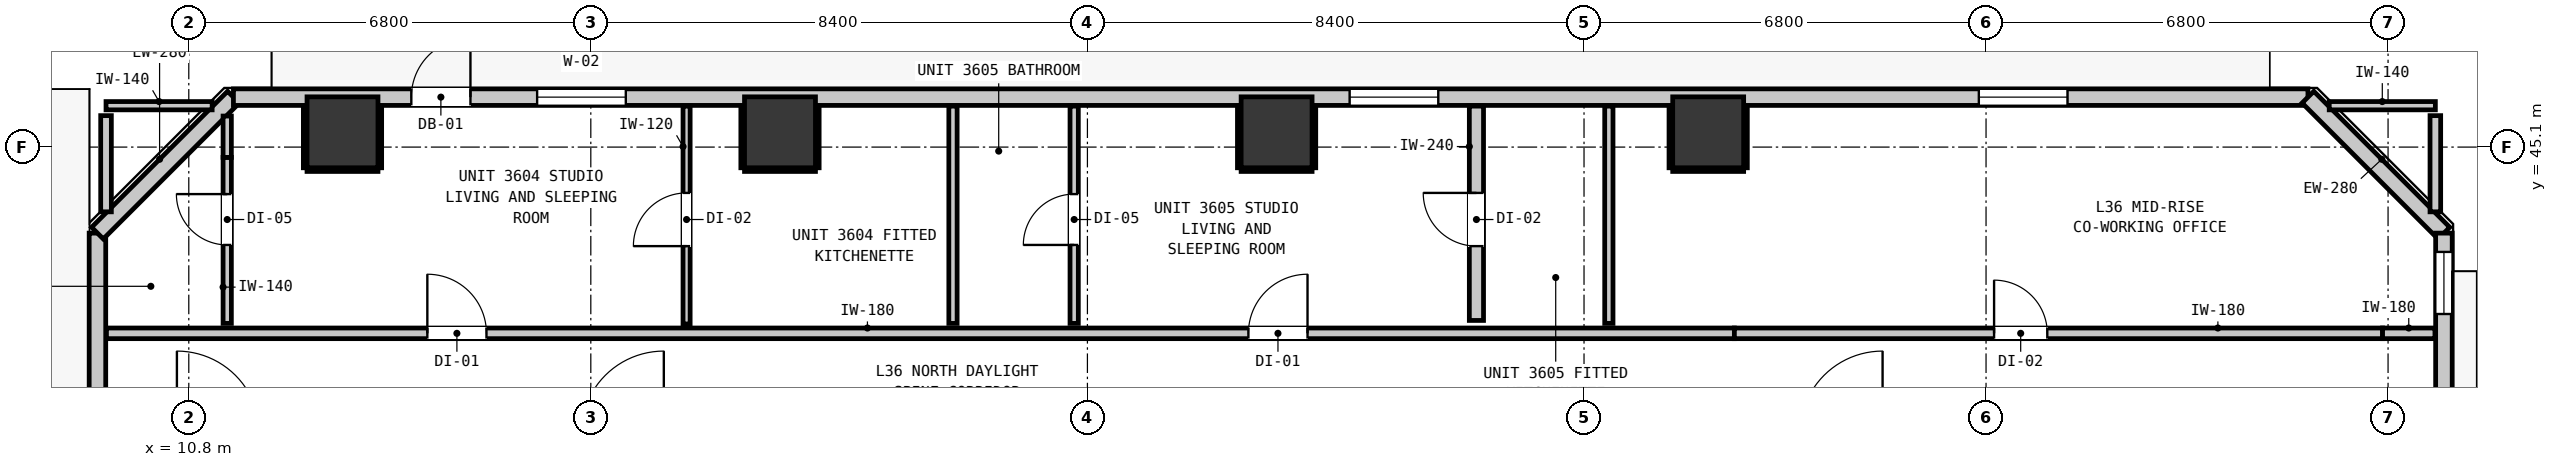
"""IFC4 building model, lengths in metres.
Left out: names, types, materials, properties, quantities, classifications, styles, units other than length and angle.
Written with IfcOpenShell. Run it as: python <this file> out.ifc"""

import sys

from ifc_helpers import new_model, si_unit, direction, frame, frame_2d, origin, origin_2d, place, context, subcontext, project, spatial, rectangle, extrude, element, fill, save


model = new_model("IFC4")
c1 = context("Model", 3, precision=1e-05, world=origin(), true_north=direction((0.0, 1.0)))
c2 = subcontext(c1, "Body", "Model", "MODEL_VIEW")
j1 = project(units=[si_unit("LENGTHUNIT", "METRE"), si_unit("PLANEANGLEUNIT", "RADIAN")], contexts=[c1])
p1 = place(None, origin())
s1 = spatial("IfcSite", under=j1, at=p1, CompositionType="ELEMENT")
p2 = place(p1, origin())
s2 = spatial("IfcBuilding", under=s1, at=p2, CompositionType="ELEMENT")
p3 = place(p2, frame((0.0, 0.0, 126.0)))
s3 = spatial("IfcBuildingStorey", under=s2, at=p3, CompositionType="ELEMENT", Elevation=126.0)
for number, where, z_axis, x_axis in (
    (1, (13.4, 45.35, -0.2), (0.0, 0.0, 1.0), (1.0, 0.0, 0.0)),
    (2, (20.8, 45.35, -0.2), (0.0, 0.0, 1.0), (1.0, 0.0, 0.0)),
    (3, (29.2, 45.35, -0.2), (0.0, 0.0, 1.0), (1.0, 0.0, 0.0)),
    (4, (36.5, 45.35, -0.2), (0.0, 0.0, 1.0), (1.0, 0.0, 0.0)),
):
    element("IfcColumn", number, at=place(p3, frame(where, z_axis=z_axis, x_axis=x_axis)), inside=s3, PredefinedType="COLUMN", context=c2, shape_type="SweptSolid", body=[
        extrude(rectangle(XDim=1.2, YDim=1.2, at=origin_2d()), origin(), (0.0, 0.0, 1.0), 3.52),
    ])
p4 = place(p3, frame((9.255, 11.355, 0.0), z_axis=(0.0, 0.0, 1.0), x_axis=(0.0, 1.0, 0.0)))
e5 = element("IfcWall", 5, at=p4, inside=s3, PredefinedType="STANDARD", context=c2, shape_type="SweptSolid", body=[
    extrude(rectangle(XDim=32.29, YDim=0.28, at=frame_2d((16.145, 0.0))), origin(), (0.0, 0.0, 1.0), 3.08),
])
p5 = place(p4, frame((0.503, 0.0, 0.0)))
e6 = element("IfcOpeningElement", 6, at=p5, cuts=e5, PredefinedType="OPENING", context=c2, shape_type="SweptSolid", body=[
    extrude(rectangle(XDim=1.1, YDim=2.15, at=frame_2d((0.55, 1.075))), frame((0.0, 0.15, 0.0), z_axis=(0.0, -1.0, 0.0), x_axis=(1.0, 0.0, 0.0)), (0.0, 0.0, 1.0), 0.3),
])
p6 = place(p3, frame((9.255, 43.645, 0.0), z_axis=(0.0, 0.0, 1.0), x_axis=(0.707106781187, 0.707106781187, 0.0)))
e7 = element("IfcWall", 7, at=p6, inside=s3, PredefinedType="STANDARD", context=c2, shape_type="SweptSolid", body=[
    extrude(rectangle(XDim=3.253, YDim=0.28, at=frame_2d((1.626, 0.0))), origin(), (0.0, 0.0, 1.0), 3.08),
])
p7 = place(p3, frame((11.555, 45.945, 0.0), z_axis=(0.0, 0.0, 1.0), x_axis=(1.0, 0.0, 0.0)))
e8 = element("IfcWall", 8, at=p7, inside=s3, PredefinedType="STANDARD", context=c2, shape_type="SweptSolid", body=[
    extrude(rectangle(XDim=35.09, YDim=0.28, at=frame_2d((17.545, 0.0))), origin(), (0.0, 0.0, 1.0), 3.08),
])
p8 = place(p7, frame((3.009, 0.0, 0.0)))
e9 = element("IfcOpeningElement", 9, at=p8, cuts=e8, PredefinedType="OPENING", context=c2, shape_type="SweptSolid", body=[
    extrude(rectangle(XDim=1.0, YDim=2.15, at=frame_2d((0.5, 1.075))), frame((0.0, 0.15, 0.0), z_axis=(0.0, -1.0, 0.0), x_axis=(1.0, 0.0, 0.0)), (0.0, 0.0, 1.0), 0.3),
])
p9 = place(p7, frame((5.137, 0.0, 0.85)))
e10 = element("IfcOpeningElement", 10, at=p9, cuts=e8, PredefinedType="OPENING", context=c2, shape_type="SweptSolid", body=[
    extrude(rectangle(XDim=1.5, YDim=1.8, at=frame_2d((0.75, 0.9))), frame((0.0, 0.15, 0.0), z_axis=(0.0, -1.0, 0.0), x_axis=(1.0, 0.0, 0.0)), (0.0, 0.0, 1.0), 0.3),
])
p10 = place(p7, frame((18.88, 0.0, 0.85)))
e11 = element("IfcOpeningElement", 11, at=p10, cuts=e8, PredefinedType="OPENING", context=c2, shape_type="SweptSolid", body=[
    extrude(rectangle(XDim=1.5, YDim=1.8, at=frame_2d((0.75, 0.9))), frame((0.0, 0.15, 0.0), z_axis=(0.0, -1.0, 0.0), x_axis=(1.0, 0.0, 0.0)), (0.0, 0.0, 1.0), 0.3),
])
p11 = place(p7, frame((29.523, 0.0, 0.85)))
e12 = element("IfcOpeningElement", 12, at=p11, cuts=e8, PredefinedType="OPENING", context=c2, shape_type="SweptSolid", body=[
    extrude(rectangle(XDim=1.5, YDim=1.8, at=frame_2d((0.75, 0.9))), frame((0.0, 0.15, 0.0), z_axis=(0.0, -1.0, 0.0), x_axis=(1.0, 0.0, 0.0)), (0.0, 0.0, 1.0), 0.3),
])
p12 = place(p3, frame((46.645, 45.945, 0.0), z_axis=(0.0, 0.0, 1.0), x_axis=(0.707106781187, -0.707106781187, 0.0)))
e13 = element("IfcWall", 13, at=p12, inside=s3, PredefinedType="STANDARD", context=c2, shape_type="SweptSolid", body=[
    extrude(rectangle(XDim=3.253, YDim=0.28, at=frame_2d((1.626, 0.0))), origin(), (0.0, 0.0, 1.0), 3.08),
])
p13 = place(p3, frame((48.945, 43.645, 0.0), z_axis=(0.0, 0.0, 1.0), x_axis=(0.0, -1.0, 0.0)))
e14 = element("IfcWall", 14, at=p13, inside=s3, PredefinedType="STANDARD", context=c2, shape_type="SweptSolid", body=[
    extrude(rectangle(XDim=32.29, YDim=0.28, at=frame_2d((16.145, 0.0))), origin(), (0.0, 0.0, 1.0), 3.08),
])
p14 = place(p13, frame((6.52, 0.0, 0.0)))
e15 = element("IfcOpeningElement", 15, at=p14, cuts=e14, PredefinedType="OPENING", context=c2, shape_type="SweptSolid", body=[
    extrude(rectangle(XDim=1.0, YDim=2.15, at=frame_2d((0.5, 1.075))), frame((0.0, 0.15, 0.0), z_axis=(0.0, -1.0, 0.0), x_axis=(1.0, 0.0, 0.0)), (0.0, 0.0, 1.0), 0.3),
])
p15 = place(p13, frame((0.318, 0.0, 0.85)))
e16 = element("IfcOpeningElement", 16, at=p15, cuts=e14, PredefinedType="OPENING", context=c2, shape_type="SweptSolid", body=[
    extrude(rectangle(XDim=1.05, YDim=1.65, at=frame_2d((0.525, 0.825))), frame((0.0, 0.15, 0.0), z_axis=(0.0, -1.0, 0.0), x_axis=(1.0, 0.0, 0.0)), (0.0, 0.0, 1.0), 0.3),
])
p16 = place(p13, frame((16.674, 0.0, 0.85)))
e17 = element("IfcOpeningElement", 17, at=p16, cuts=e14, PredefinedType="OPENING", context=c2, shape_type="SweptSolid", body=[
    extrude(rectangle(XDim=1.5, YDim=1.8, at=frame_2d((0.75, 0.9))), frame((0.0, 0.15, 0.0), z_axis=(0.0, -1.0, 0.0), x_axis=(1.0, 0.0, 0.0)), (0.0, 0.0, 1.0), 0.3),
])
p17 = place(p13, frame((13.773, 0.0, 0.85)))
e18 = element("IfcOpeningElement", 18, at=p17, cuts=e14, PredefinedType="OPENING", context=c2, shape_type="SweptSolid", body=[
    extrude(rectangle(XDim=1.05, YDim=1.65, at=frame_2d((0.525, 0.825))), frame((0.0, 0.15, 0.0), z_axis=(0.0, -1.0, 0.0), x_axis=(1.0, 0.0, 0.0)), (0.0, 0.0, 1.0), 0.3),
])
p18 = place(p13, frame((7.907, 0.0, 0.85)))
e19 = element("IfcOpeningElement", 19, at=p18, cuts=e14, PredefinedType="OPENING", context=c2, shape_type="SweptSolid", body=[
    extrude(rectangle(XDim=1.5, YDim=1.8, at=frame_2d((0.75, 0.9))), frame((0.0, 0.15, 0.0), z_axis=(0.0, -1.0, 0.0), x_axis=(1.0, 0.0, 0.0)), (0.0, 0.0, 1.0), 0.3),
])
p19 = place(p13, frame((5.043, 0.0, 0.85)))
e20 = element("IfcOpeningElement", 20, at=p19, cuts=e14, PredefinedType="OPENING", context=c2, shape_type="SweptSolid", body=[
    extrude(rectangle(XDim=0.58, YDim=1.5, at=frame_2d((0.29, 0.75))), frame((0.0, 0.15, 0.0), z_axis=(0.0, -1.0, 0.0), x_axis=(1.0, 0.0, 0.0)), (0.0, 0.0, 1.0), 0.3),
])
p20 = place(p3, frame((9.407, 41.95, 0.0), z_axis=(0.0, 0.0, 1.0), x_axis=(1.0, 0.0, 0.0)))
e21 = element("IfcWall", 21, at=p20, inside=s3, PredefinedType="PARTITIONING", context=c2, shape_type="SweptSolid", body=[
    extrude(rectangle(XDim=27.536, YDim=0.18, at=frame_2d((13.768, 0.0))), origin(), (0.0, 0.0, 1.0), 3.08),
])
p21 = place(p20, frame((5.428, 0.0, 0.0)))
e22 = element("IfcOpeningElement", 22, at=p21, cuts=e21, PredefinedType="OPENING", context=c2, shape_type="SweptSolid", body=[
    extrude(rectangle(XDim=1.0, YDim=2.15, at=frame_2d((0.5, 1.075))), frame((0.0, 0.1, 0.0), z_axis=(0.0, -1.0, 0.0), x_axis=(1.0, 0.0, 0.0)), (0.0, 0.0, 1.0), 0.2),
])
p22 = place(p20, frame((19.316, 0.0, 0.0)))
e23 = element("IfcOpeningElement", 23, at=p22, cuts=e21, PredefinedType="OPENING", context=c2, shape_type="SweptSolid", body=[
    extrude(rectangle(XDim=1.0, YDim=2.15, at=frame_2d((0.5, 1.075))), frame((0.0, 0.1, 0.0), z_axis=(0.0, -1.0, 0.0), x_axis=(1.0, 0.0, 0.0)), (0.0, 0.0, 1.0), 0.2),
])
p23 = place(p3, frame((36.943, 41.95, 0.0), z_axis=(0.0, 0.0, 1.0), x_axis=(1.0, 0.0, 0.0)))
e24 = element("IfcWall", 24, at=p23, inside=s3, PredefinedType="PARTITIONING", context=c2, shape_type="SweptSolid", body=[
    extrude(rectangle(XDim=10.964, YDim=0.18, at=frame_2d((5.482, 0.0))), origin(), (0.0, 0.0, 1.0), 2.565),
])
p24 = place(p23, frame((4.393, 0.0, 0.0)))
e25 = element("IfcOpeningElement", 25, at=p24, cuts=e24, PredefinedType="OPENING", context=c2, shape_type="SweptSolid", body=[
    extrude(rectangle(XDim=0.9, YDim=2.1, at=frame_2d((0.45, 1.05))), frame((0.0, 0.1, 0.0), z_axis=(0.0, -1.0, 0.0), x_axis=(1.0, 0.0, 0.0)), (0.0, 0.0, 1.0), 0.2),
])
p25 = place(p3, frame((47.907, 41.95, 0.0), z_axis=(0.0, 0.0, 1.0), x_axis=(1.0, 0.0, 0.0)))
e26 = element("IfcWall", 26, at=p25, inside=s3, PredefinedType="PARTITIONING", context=c2, shape_type="SweptSolid", body=[
    extrude(rectangle(XDim=0.886, YDim=0.18, at=frame_2d((0.443, 0.0))), origin(), (0.0, 0.0, 1.0), 3.08),
])
for number, where, z_axis, x_axis in (
    (27, (9.4, 45.8, 0.0), (0.0, 0.0, 1.0), (1.0, 0.0, 0.0)),
    (28, (47.005, 45.8, 0.0), (0.0, 0.0, 1.0), (1.0, 0.0, 0.0)),
):
    element("IfcWall", number, at=place(p3, frame(where, z_axis=z_axis, x_axis=x_axis)), inside=s3, PredefinedType="PARTITIONING", context=c2, shape_type="SweptSolid", body=[
        extrude(rectangle(XDim=1.795, YDim=0.14, at=frame_2d((0.897, 0.0))), origin(), (0.0, 0.0, 1.0), 3.08),
    ])
p26 = place(p3, frame((32.58, 42.168, 0.0), z_axis=(0.0, 0.0, 1.0), x_axis=(0.0, 1.0, 0.0)))
e29 = element("IfcWall", 29, at=p26, inside=s3, PredefinedType="PARTITIONING", context=c2, shape_type="SweptSolid", body=[
    extrude(rectangle(XDim=3.625, YDim=0.24, at=frame_2d((1.812, 0.0))), origin(), (0.0, 0.0, 1.0), 3.08),
])
p27 = place(p26, frame((1.257, 0.0, 0.0)))
e30 = element("IfcOpeningElement", 30, at=p27, cuts=e29, PredefinedType="OPENING", context=c2, shape_type="SweptSolid", body=[
    extrude(rectangle(XDim=0.9, YDim=2.1, at=frame_2d((0.45, 1.05))), frame((0.0, 0.13, 0.0), z_axis=(0.0, -1.0, 0.0), x_axis=(1.0, 0.0, 0.0)), (0.0, 0.0, 1.0), 0.26),
])
for number, where, z_axis, x_axis in (
    (31, (9.4, 44.005, 0.0), (0.0, 0.0, 1.0), (0.0, 1.0, 0.0)),
    (32, (48.8, 44.005, 0.0), (0.0, 0.0, 1.0), (0.0, 1.0, 0.0)),
):
    element("IfcWall", number, at=place(p3, frame(where, z_axis=z_axis, x_axis=x_axis)), inside=s3, PredefinedType="PARTITIONING", context=c2, shape_type="SweptSolid", body=[
        extrude(rectangle(XDim=1.627, YDim=0.18, at=frame_2d((0.813, 0.0))), origin(), (0.0, 0.0, 1.0), 3.08),
    ])
p28 = place(p3, frame((11.45, 42.118, 0.0), z_axis=(0.0, 0.0, 1.0), x_axis=(0.0, 1.0, 0.0)))
e33 = element("IfcWall", 33, at=p28, inside=s3, PredefinedType="PARTITIONING", context=c2, shape_type="SweptSolid", body=[
    extrude(rectangle(XDim=2.808, YDim=0.14, at=frame_2d((1.404, 0.0))), origin(), (0.0, 0.0, 1.0), 2.565),
])
p29 = place(p28, frame((1.327, 0.0, 0.0)))
e34 = element("IfcOpeningElement", 34, at=p29, cuts=e33, PredefinedType="OPENING", context=c2, shape_type="SweptSolid", body=[
    extrude(rectangle(XDim=0.86, YDim=2.02, at=frame_2d((0.43, 1.01))), frame((0.0, 0.08, 0.0), z_axis=(0.0, -1.0, 0.0), x_axis=(1.0, 0.0, 0.0)), (0.0, 0.0, 1.0), 0.16),
])
p30 = place(p3, frame((11.45, 44.926, 0.0), z_axis=(0.0, 0.0, 1.0), x_axis=(0.0, 1.0, 0.0)))
e35 = element("IfcWall", 35, at=p30, inside=s3, PredefinedType="PARTITIONING", context=c2, shape_type="SweptSolid", body=[
    extrude(rectangle(XDim=0.699, YDim=0.14, at=frame_2d((0.35, 0.0))), origin(), (0.0, 0.0, 1.0), 3.08),
])
p31 = place(p3, frame((23.726, 42.118, 0.0), z_axis=(0.0, 0.0, 1.0), x_axis=(0.0, 1.0, 0.0)))
e36 = element("IfcWall", 36, at=p31, inside=s3, PredefinedType="PARTITIONING", context=c2, shape_type="SweptSolid", body=[
    extrude(rectangle(XDim=3.675, YDim=0.14, at=frame_2d((1.837, 0.0))), origin(), (0.0, 0.0, 1.0), 3.08),
])
p32 = place(p3, frame((25.776, 42.118, 0.0), z_axis=(0.0, 0.0, 1.0), x_axis=(0.0, 1.0, 0.0)))
e37 = element("IfcWall", 37, at=p32, inside=s3, PredefinedType="PARTITIONING", context=c2, shape_type="SweptSolid", body=[
    extrude(rectangle(XDim=3.675, YDim=0.14, at=frame_2d((1.837, 0.0))), origin(), (0.0, 0.0, 1.0), 3.08),
])
p33 = place(p32, frame((1.327, 0.0, 0.0)))
e38 = element("IfcOpeningElement", 38, at=p33, cuts=e37, PredefinedType="OPENING", context=c2, shape_type="SweptSolid", body=[
    extrude(rectangle(XDim=0.86, YDim=2.02, at=frame_2d((0.43, 1.01))), frame((0.0, 0.08, 0.0), z_axis=(0.0, -1.0, 0.0), x_axis=(1.0, 0.0, 0.0)), (0.0, 0.0, 1.0), 0.16),
])
p34 = place(p3, frame((34.82, 42.118, 0.0), z_axis=(0.0, 0.0, 1.0), x_axis=(0.0, 1.0, 0.0)))
e39 = element("IfcWall", 39, at=p34, inside=s3, PredefinedType="PARTITIONING", context=c2, shape_type="SweptSolid", body=[
    extrude(rectangle(XDim=3.675, YDim=0.14, at=frame_2d((1.837, 0.0))), origin(), (0.0, 0.0, 1.0), 3.08),
])
p35 = place(p3, frame((19.22, 42.108, 0.0), z_axis=(0.0, 0.0, 1.0), x_axis=(0.0, 1.0, 0.0)))
e40 = element("IfcWall", 40, at=p35, inside=s3, PredefinedType="PARTITIONING", context=c2, shape_type="SweptSolid", body=[
    extrude(rectangle(XDim=3.685, YDim=0.12, at=frame_2d((1.843, 0.0))), origin(), (0.0, 0.0, 1.0), 3.08),
])
p36 = place(p35, frame((1.317, 0.0, 0.0)))
e41 = element("IfcOpeningElement", 41, at=p36, cuts=e40, PredefinedType="OPENING", context=c2, shape_type="SweptSolid", body=[
    extrude(rectangle(XDim=0.9, YDim=2.1, at=frame_2d((0.45, 1.05))), frame((0.0, 0.07, 0.0), z_axis=(0.0, -1.0, 0.0), x_axis=(1.0, 0.0, 0.0)), (0.0, 0.0, 1.0), 0.14),
])
p37 = place(p3, frame((12.8, 44.718, 0.0), z_axis=(0.0, 0.0, 1.0), x_axis=(1.0, 0.0, 0.0)))
e42 = element("IfcWall", 42, at=p37, inside=s3, PredefinedType="PARTITIONING", context=c2, shape_type="SweptSolid", body=[
    extrude(rectangle(XDim=1.2, YDim=0.06, at=frame_2d((0.6, 0.0))), origin(), (0.0, 0.0, 1.0), 1.45),
])
for number, where, z_axis, x_axis in (
    (43, (12.768, 44.75, 0.0), (0.0, 0.0, 1.0), (0.0, 1.0, 0.0)),
    (44, (14.032, 44.75, 0.0), (0.0, 0.0, 1.0), (0.0, 1.0, 0.0)),
):
    element("IfcWall", number, at=place(p3, frame(where, z_axis=z_axis, x_axis=x_axis)), inside=s3, PredefinedType="PARTITIONING", context=c2, shape_type="SweptSolid", body=[
        extrude(rectangle(XDim=1.04, YDim=0.06, at=frame_2d((0.52, 0.0))), origin(), (0.0, 0.0, 1.0), 1.45),
    ])
p38 = place(p3, frame((20.2, 44.718, 0.0), z_axis=(0.0, 0.0, 1.0), x_axis=(1.0, 0.0, 0.0)))
e45 = element("IfcWall", 45, at=p38, inside=s3, PredefinedType="PARTITIONING", context=c2, shape_type="SweptSolid", body=[
    extrude(rectangle(XDim=1.2, YDim=0.06, at=frame_2d((0.6, 0.0))), origin(), (0.0, 0.0, 1.0), 1.45),
])
for number, where, z_axis, x_axis in (
    (46, (20.168, 44.75, 0.0), (0.0, 0.0, 1.0), (0.0, 1.0, 0.0)),
    (47, (21.432, 44.75, 0.0), (0.0, 0.0, 1.0), (0.0, 1.0, 0.0)),
):
    element("IfcWall", number, at=place(p3, frame(where, z_axis=z_axis, x_axis=x_axis)), inside=s3, PredefinedType="PARTITIONING", context=c2, shape_type="SweptSolid", body=[
        extrude(rectangle(XDim=1.04, YDim=0.06, at=frame_2d((0.52, 0.0))), origin(), (0.0, 0.0, 1.0), 1.45),
    ])
p39 = place(p3, frame((28.6, 44.718, 0.0), z_axis=(0.0, 0.0, 1.0), x_axis=(1.0, 0.0, 0.0)))
e48 = element("IfcWall", 48, at=p39, inside=s3, PredefinedType="PARTITIONING", context=c2, shape_type="SweptSolid", body=[
    extrude(rectangle(XDim=1.2, YDim=0.06, at=frame_2d((0.6, 0.0))), origin(), (0.0, 0.0, 1.0), 1.45),
])
for number, where, z_axis, x_axis in (
    (49, (28.568, 44.75, 0.0), (0.0, 0.0, 1.0), (0.0, 1.0, 0.0)),
    (50, (29.832, 44.75, 0.0), (0.0, 0.0, 1.0), (0.0, 1.0, 0.0)),
):
    element("IfcWall", number, at=place(p3, frame(where, z_axis=z_axis, x_axis=x_axis)), inside=s3, PredefinedType="PARTITIONING", context=c2, shape_type="SweptSolid", body=[
        extrude(rectangle(XDim=1.04, YDim=0.06, at=frame_2d((0.52, 0.0))), origin(), (0.0, 0.0, 1.0), 1.45),
    ])
p40 = place(p3, frame((35.9, 44.718, 0.0), z_axis=(0.0, 0.0, 1.0), x_axis=(1.0, 0.0, 0.0)))
e51 = element("IfcWall", 51, at=p40, inside=s3, PredefinedType="PARTITIONING", context=c2, shape_type="SweptSolid", body=[
    extrude(rectangle(XDim=1.2, YDim=0.06, at=frame_2d((0.6, 0.0))), origin(), (0.0, 0.0, 1.0), 1.45),
])
for number, where, z_axis, x_axis in (
    (52, (35.868, 44.75, 0.0), (0.0, 0.0, 1.0), (0.0, 1.0, 0.0)),
    (53, (37.132, 44.75, 0.0), (0.0, 0.0, 1.0), (0.0, 1.0, 0.0)),
):
    element("IfcWall", number, at=place(p3, frame(where, z_axis=z_axis, x_axis=x_axis)), inside=s3, PredefinedType="PARTITIONING", context=c2, shape_type="SweptSolid", body=[
        extrude(rectangle(XDim=1.04, YDim=0.06, at=frame_2d((0.52, 0.0))), origin(), (0.0, 0.0, 1.0), 1.45),
    ])
p41 = place(p8, origin())
e54 = element("IfcDoor", 54, at=p41, inside=s3, OperationType="SINGLE_SWING_RIGHT", PredefinedType="DOOR", context=c2, shape_type="SweptSolid", body=[
    extrude(rectangle(XDim=1.0, YDim=2.15, at=frame_2d((0.5, 1.075))), frame((0.0, 0.025, 0.0), z_axis=(0.0, -1.0, 0.0), x_axis=(1.0, 0.0, 0.0)), (0.0, 0.0, 1.0), 0.05),
])
fill(e9, e54)
p42 = place(p9, origin())
e55 = element("IfcWindow", 55, at=p42, inside=s3, PartitioningType="SINGLE_PANEL", PredefinedType="WINDOW", context=c2, shape_type="SweptSolid", body=[
    extrude(rectangle(XDim=1.5, YDim=1.8, at=frame_2d((0.75, 0.9))), frame((0.0, 0.03, 0.0), z_axis=(0.0, -1.0, 0.0), x_axis=(1.0, 0.0, 0.0)), (0.0, 0.0, 1.0), 0.06),
])
fill(e10, e55)
p43 = place(p10, origin())
e56 = element("IfcWindow", 56, at=p43, inside=s3, PartitioningType="SINGLE_PANEL", PredefinedType="WINDOW", context=c2, shape_type="SweptSolid", body=[
    extrude(rectangle(XDim=1.5, YDim=1.8, at=frame_2d((0.75, 0.9))), frame((0.0, 0.03, 0.0), z_axis=(0.0, -1.0, 0.0), x_axis=(1.0, 0.0, 0.0)), (0.0, 0.0, 1.0), 0.06),
])
fill(e11, e56)
p44 = place(p11, origin())
e57 = element("IfcWindow", 57, at=p44, inside=s3, PartitioningType="SINGLE_PANEL", PredefinedType="WINDOW", context=c2, shape_type="SweptSolid", body=[
    extrude(rectangle(XDim=1.5, YDim=1.8, at=frame_2d((0.75, 0.9))), frame((0.0, 0.03, 0.0), z_axis=(0.0, -1.0, 0.0), x_axis=(1.0, 0.0, 0.0)), (0.0, 0.0, 1.0), 0.06),
])
fill(e12, e57)
p45 = place(p15, origin())
e58 = element("IfcWindow", 58, at=p45, inside=s3, PartitioningType="SINGLE_PANEL", PredefinedType="WINDOW", context=c2, shape_type="SweptSolid", body=[
    extrude(rectangle(XDim=1.05, YDim=1.65, at=frame_2d((0.525, 0.825))), frame((0.0, 0.03, 0.0), z_axis=(0.0, -1.0, 0.0), x_axis=(1.0, 0.0, 0.0)), (0.0, 0.0, 1.0), 0.06),
])
fill(e16, e58)
p46 = place(p21, origin())
e59 = element("IfcDoor", 59, at=p46, inside=s3, OperationType="SINGLE_SWING_LEFT", PredefinedType="DOOR", context=c2, shape_type="SweptSolid", body=[
    extrude(rectangle(XDim=1.0, YDim=2.15, at=frame_2d((0.5, 1.075))), frame((0.0, 0.025, 0.0), z_axis=(0.0, -1.0, 0.0), x_axis=(1.0, 0.0, 0.0)), (0.0, 0.0, 1.0), 0.05),
])
fill(e22, e59)
p47 = place(p29, origin())
e60 = element("IfcDoor", 60, at=p47, inside=s3, OperationType="SINGLE_SWING_RIGHT", PredefinedType="DOOR", context=c2, shape_type="SweptSolid", body=[
    extrude(rectangle(XDim=0.86, YDim=2.02, at=frame_2d((0.43, 1.01))), frame((0.0, 0.025, 0.0), z_axis=(0.0, -1.0, 0.0), x_axis=(1.0, 0.0, 0.0)), (0.0, 0.0, 1.0), 0.05),
])
fill(e34, e60)
p48 = place(p36, origin())
e61 = element("IfcDoor", 61, at=p48, inside=s3, OperationType="SINGLE_SWING_LEFT", PredefinedType="DOOR", context=c2, shape_type="SweptSolid", body=[
    extrude(rectangle(XDim=0.9, YDim=2.1, at=frame_2d((0.45, 1.05))), frame((0.0, 0.025, 0.0), z_axis=(0.0, -1.0, 0.0), x_axis=(1.0, 0.0, 0.0)), (0.0, 0.0, 1.0), 0.05),
])
fill(e41, e61)
p49 = place(p22, origin())
e62 = element("IfcDoor", 62, at=p49, inside=s3, OperationType="SINGLE_SWING_RIGHT", PredefinedType="DOOR", context=c2, shape_type="SweptSolid", body=[
    extrude(rectangle(XDim=1.0, YDim=2.15, at=frame_2d((0.5, 1.075))), frame((0.0, 0.025, 0.0), z_axis=(0.0, -1.0, 0.0), x_axis=(1.0, 0.0, 0.0)), (0.0, 0.0, 1.0), 0.05),
])
fill(e23, e62)
p50 = place(p33, origin())
e63 = element("IfcDoor", 63, at=p50, inside=s3, OperationType="SINGLE_SWING_LEFT", PredefinedType="DOOR", context=c2, shape_type="SweptSolid", body=[
    extrude(rectangle(XDim=0.86, YDim=2.02, at=frame_2d((0.43, 1.01))), frame((0.0, 0.025, 0.0), z_axis=(0.0, -1.0, 0.0), x_axis=(1.0, 0.0, 0.0)), (0.0, 0.0, 1.0), 0.05),
])
fill(e38, e63)
p51 = place(p27, origin())
e64 = element("IfcDoor", 64, at=p51, inside=s3, OperationType="SINGLE_SWING_RIGHT", PredefinedType="DOOR", context=c2, shape_type="SweptSolid", body=[
    extrude(rectangle(XDim=0.9, YDim=2.1, at=frame_2d((0.45, 1.05))), frame((0.0, 0.025, 0.0), z_axis=(0.0, -1.0, 0.0), x_axis=(1.0, 0.0, 0.0)), (0.0, 0.0, 1.0), 0.05),
])
fill(e30, e64)
p52 = place(p24, origin())
e65 = element("IfcDoor", 65, at=p52, inside=s3, OperationType="SINGLE_SWING_LEFT", PredefinedType="DOOR", context=c2, shape_type="SweptSolid", body=[
    extrude(rectangle(XDim=0.9, YDim=2.1, at=frame_2d((0.45, 1.05))), frame((0.0, 0.025, 0.0), z_axis=(0.0, -1.0, 0.0), x_axis=(1.0, 0.0, 0.0)), (0.0, 0.0, 1.0), 0.05),
])
fill(e25, e65)
save(model, sys.argv[1])
